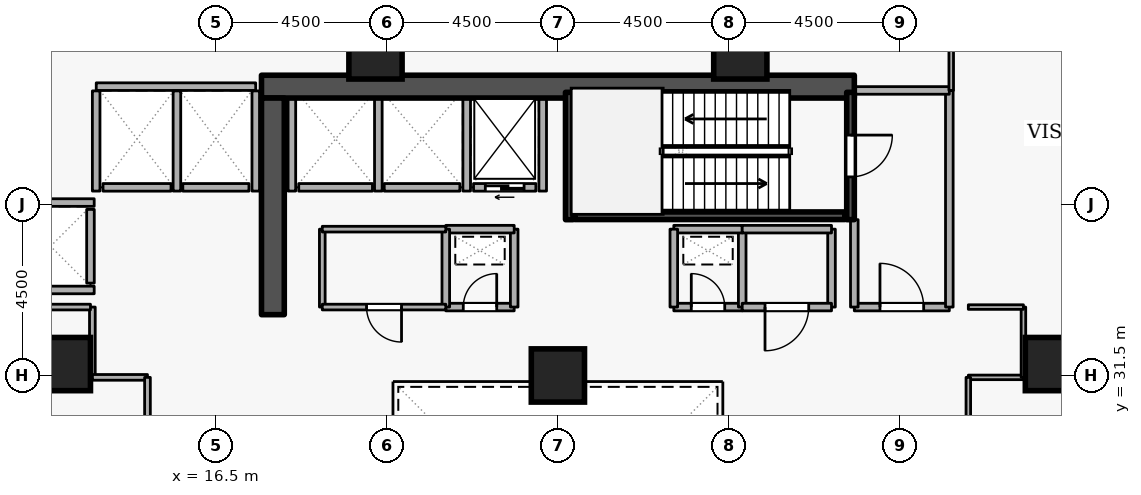
"""IFC4 building model, lengths in metres.
Left out: names, types, materials, properties, quantities, classifications, styles, units other than length and angle.
Written with IfcOpenShell. Run it as: python <this file> out.ifc"""

import sys

from ifc_helpers import new_model, si_unit, direction, frame, frame_2d, origin, origin_2d, place, context, subcontext, project, spatial, rectangle, extrude, element, fill, save


model = new_model("IFC4")
c1 = context("Model", 3, precision=1e-05, world=origin(), true_north=direction((0.0, 1.0)))
c2 = subcontext(c1, "Body", "Model", "MODEL_VIEW")
j1 = project(units=[si_unit("LENGTHUNIT", "METRE"), si_unit("PLANEANGLEUNIT", "RADIAN")], contexts=[c1])
p1 = place(None, origin())
s1 = spatial("IfcSite", under=j1, at=p1, CompositionType="ELEMENT")
p2 = place(p1, origin())
s2 = spatial("IfcBuilding", under=s1, at=p2, CompositionType="ELEMENT")
p3 = place(p2, frame((0.0, 0.0, 49.5)))
s3 = spatial("IfcBuildingStorey", under=s2, at=p3, CompositionType="ELEMENT", Elevation=49.5)
p4 = place(p3, frame((17.7, 39.1, 0.0), z_axis=(0.0, 0.0, 1.0), x_axis=(1.0, 0.0, 0.0)))
e1 = element("IfcWall", 1, at=p4, inside=s3, PredefinedType="SHEAR", context=c2, shape_type="SweptSolid", body=[
    extrude(rectangle(XDim=15.6, YDim=0.6, at=frame_2d((7.8, 0.0))), origin(), (0.0, 0.0, 1.0), 4.2),
])
p5 = place(p3, frame((18.0, 33.1, 0.0), z_axis=(0.0, 0.0, 1.0), x_axis=(0.0, 1.0, 0.0)))
e2 = element("IfcWall", 2, at=p5, inside=s3, PredefinedType="SHEAR", context=c2, shape_type="SweptSolid", body=[
    extrude(rectangle(XDim=5.7, YDim=0.6, at=frame_2d((2.85, 0.0))), origin(), (0.0, 0.0, 1.0), 4.2),
])
for number, where, z_axis, x_axis in (
    (3, (12.5, 31.8, 0.0), (0.0, 0.0, 1.0), (1.0, 0.0, 0.0)),
    (4, (38.5, 31.8, 0.0), (0.0, 0.0, 1.0), (1.0, 0.0, 0.0)),
    (5, (20.7, 40.0, 0.0), (0.0, 0.0, 1.0), (1.0, 0.0, 0.0)),
    (6, (30.3, 40.0, 0.0), (0.0, 0.0, 1.0), (1.0, 0.0, 0.0)),
    (7, (25.5, 31.5, 0.0), (0.0, 0.0, 1.0), (1.0, 0.0, 0.0)),
):
    element("IfcColumn", number, at=place(p3, frame(where, z_axis=z_axis, x_axis=x_axis)), inside=s3, PredefinedType="COLUMN", context=c2, shape_type="SweptSolid", body=[
        extrude(rectangle(XDim=1.4, YDim=1.4, at=origin_2d()), origin(), (0.0, 0.0, 1.0), 4.2),
    ])
p6 = place(p3, frame((24.92, 36.45, 0.0), z_axis=(0.0, 0.0, 1.0), x_axis=(-1.0, 0.0, 0.0)))
e8 = element("IfcWall", 8, at=p6, inside=s3, PredefinedType="STANDARD", context=c2, shape_type="SweptSolid", body=[
    extrude(rectangle(XDim=1.64, YDim=0.2, at=frame_2d((0.82, 0.0))), origin(), (0.0, 0.0, 1.0), 3.94),
])
p7 = place(p6, frame((0.31, 0.0, 0.0)))
e9 = element("IfcOpeningElement", 9, at=p7, cuts=e8, PredefinedType="OPENING", context=c2, shape_type="SweptSolid", body=[
    extrude(rectangle(XDim=1.02, YDim=2.06, at=frame_2d((0.51, 1.03))), frame((0.0, 0.11, 0.0), z_axis=(0.0, -1.0, 0.0), x_axis=(1.0, 0.0, 0.0)), (0.0, 0.0, 1.0), 0.22),
])
p8 = place(p3, frame((22.92, 36.45, 0.0), z_axis=(0.0, 0.0, 1.0), x_axis=(-1.0, 0.0, 0.0)))
e10 = element("IfcWall", 10, at=p8, inside=s3, PredefinedType="STANDARD", context=c2, shape_type="SweptSolid", body=[
    extrude(rectangle(XDim=1.99, YDim=0.2, at=frame_2d((0.995, 0.0))), origin(), (0.0, 0.0, 1.0), 3.94),
])
p9 = place(p3, frame((20.62, 36.45, 0.0), z_axis=(0.0, 0.0, 1.0), x_axis=(-1.0, 0.0, 0.0)))
e11 = element("IfcWall", 11, at=p9, inside=s3, PredefinedType="STANDARD", context=c2, shape_type="SweptSolid", body=[
    extrude(rectangle(XDim=1.94, YDim=0.2, at=frame_2d((0.97, 0.0))), origin(), (0.0, 0.0, 1.0), 3.94),
])
p10 = place(p3, frame((17.37, 36.45, 0.0), z_axis=(0.0, 0.0, 1.0), x_axis=(-1.0, 0.0, 0.0)))
e12 = element("IfcWall", 12, at=p10, inside=s3, PredefinedType="STANDARD", context=c2, shape_type="SweptSolid", body=[
    extrude(rectangle(XDim=1.74, YDim=0.2, at=frame_2d((0.87, 0.0))), origin(), (0.0, 0.0, 1.0), 3.94),
])
p11 = place(p3, frame((15.32, 36.45, 0.0), z_axis=(0.0, 0.0, 1.0), x_axis=(-1.0, 0.0, 0.0)))
e13 = element("IfcWall", 13, at=p11, inside=s3, PredefinedType="STANDARD", context=c2, shape_type="SweptSolid", body=[
    extrude(rectangle(XDim=1.79, YDim=0.2, at=frame_2d((0.895, 0.0))), origin(), (0.0, 0.0, 1.0), 3.94),
])
p12 = place(p3, frame((13.2, 33.93, 0.0), z_axis=(0.0, 0.0, 1.0), x_axis=(0.0, 1.0, 0.0)))
e14 = element("IfcWall", 14, at=p12, inside=s3, PredefinedType="STANDARD", context=c2, shape_type="SweptSolid", body=[
    extrude(rectangle(XDim=1.94, YDim=0.2, at=frame_2d((0.97, 0.0))), origin(), (0.0, 0.0, 1.0), 3.94),
])
for number, where, z_axis, x_axis in (
    (15, (25.1, 36.352, 0.0), (0.0, 0.0, 1.0), (0.0, 1.0, 0.0)),
    (16, (23.1, 36.352, 0.0), (0.0, 0.0, 1.0), (0.0, 1.0, 0.0)),
    (17, (20.775, 36.352, 0.0), (0.0, 0.0, 1.0), (0.0, 1.0, 0.0)),
    (18, (18.5, 36.352, 0.0), (0.0, 0.0, 1.0), (0.0, 1.0, 0.0)),
):
    element("IfcWall", number, at=place(p3, frame(where, z_axis=z_axis, x_axis=x_axis)), inside=s3, PredefinedType="STANDARD", context=c2, shape_type="SweptSolid", body=[
        extrude(rectangle(XDim=2.436, YDim=0.2, at=frame_2d((1.218, 0.0))), origin(), (0.0, 0.0, 1.0), 3.94),
    ])
p13 = place(p3, frame((13.352, 39.1, 0.0), z_axis=(0.0, 0.0, 1.0), x_axis=(1.0, 0.0, 0.0)))
e19 = element("IfcWall", 19, at=p13, inside=s3, PredefinedType="STANDARD", context=c2, shape_type="SweptSolid", body=[
    extrude(rectangle(XDim=4.196, YDim=0.2, at=frame_2d((2.098, 0.0))), origin(), (0.0, 0.0, 1.0), 3.94),
])
p14 = place(p3, frame((17.55, 36.352, 0.0), z_axis=(0.0, 0.0, 1.0), x_axis=(0.0, 1.0, 0.0)))
e20 = element("IfcWall", 20, at=p14, inside=s3, PredefinedType="STANDARD", context=c2, shape_type="SweptSolid", body=[
    extrude(rectangle(XDim=2.636, YDim=0.2, at=frame_2d((1.318, 0.0))), origin(), (0.0, 0.0, 1.0), 3.145),
])
for number, where, z_axis, x_axis in (
    (21, (15.475, 36.352, 0.0), (0.0, 0.0, 1.0), (0.0, 1.0, 0.0)),
    (22, (13.35, 36.352, 0.0), (0.0, 0.0, 1.0), (0.0, 1.0, 0.0)),
):
    element("IfcWall", number, at=place(p3, frame(where, z_axis=z_axis, x_axis=x_axis)), inside=s3, PredefinedType="STANDARD", context=c2, shape_type="SweptSolid", body=[
        extrude(rectangle(XDim=2.636, YDim=0.2, at=frame_2d((1.318, 0.0))), origin(), (0.0, 0.0, 1.0), 3.94),
    ])
for number, where, z_axis, x_axis in (
    (23, (11.002, 36.05, 0.0), (0.0, 0.0, 1.0), (1.0, 0.0, 0.0)),
    (24, (11.002, 33.75, 0.0), (0.0, 0.0, 1.0), (1.0, 0.0, 0.0)),
):
    element("IfcWall", number, at=place(p3, frame(where, z_axis=z_axis, x_axis=x_axis)), inside=s3, PredefinedType="STANDARD", context=c2, shape_type="SweptSolid", body=[
        extrude(rectangle(XDim=2.296, YDim=0.2, at=frame_2d((1.148, 0.0))), origin(), (0.0, 0.0, 1.0), 3.94),
    ])
p15 = place(p3, frame((33.2, 38.95, 0.0), z_axis=(0.0, 0.0, 1.0), x_axis=(0.0, -1.0, 0.0)))
e25 = element("IfcWall", 25, at=p15, inside=s3, PredefinedType="SHEAR", context=c2, shape_type="SweptSolid", body=[
    extrude(rectangle(XDim=3.35, YDim=0.2, at=frame_2d((1.675, 0.0))), origin(), (0.0, 0.0, 1.0), 4.2),
])
p16 = place(p15, frame((1.125, 0.0, 0.0)))
e26 = element("IfcOpeningElement", 26, at=p16, cuts=e25, PredefinedType="OPENING", context=c2, shape_type="SweptSolid", body=[
    extrude(rectangle(XDim=1.1, YDim=2.1, at=frame_2d((0.55, 1.05))), frame((0.0, 0.11, 0.0), z_axis=(0.0, -1.0, 0.0), x_axis=(1.0, 0.0, 0.0)), (0.0, 0.0, 1.0), 0.22),
])
p17 = place(p3, frame((25.8, 35.6, 0.0), z_axis=(0.0, 0.0, 1.0), x_axis=(0.0, 1.0, 0.0)))
e27 = element("IfcWall", 27, at=p17, inside=s3, PredefinedType="SHEAR", context=c2, shape_type="SweptSolid", body=[
    extrude(rectangle(XDim=3.35, YDim=0.2, at=frame_2d((1.675, 0.0))), origin(), (0.0, 0.0, 1.0), 4.2),
])
p18 = place(p3, frame((25.95, 35.703, 0.0), z_axis=(0.0, 0.0, 1.0), x_axis=(1.0, 0.0, 0.0)))
e28 = element("IfcWall", 28, at=p18, inside=s3, PredefinedType="SHEAR", context=c2, shape_type="SweptSolid", body=[
    extrude(rectangle(XDim=7.1, YDim=0.2, at=frame_2d((3.55, 0.0))), origin(), (0.0, 0.0, 1.0), 4.2),
])
p19 = place(p3, frame((33.3, 33.3, 0.0), z_axis=(0.0, 0.0, 1.0), x_axis=(1.0, 0.0, 0.0)))
e29 = element("IfcWall", 29, at=p19, inside=s3, PredefinedType="STANDARD", context=c2, shape_type="SweptSolid", body=[
    extrude(rectangle(XDim=2.5, YDim=0.2, at=frame_2d((1.25, 0.0))), origin(), (0.0, 0.0, 1.0), 3.94),
])
p20 = place(p19, frame((0.675, 0.0, 0.0)))
e30 = element("IfcOpeningElement", 30, at=p20, cuts=e29, PredefinedType="OPENING", context=c2, shape_type="SweptSolid", body=[
    extrude(rectangle(XDim=1.15, YDim=2.1, at=frame_2d((0.575, 1.05))), frame((0.0, 0.11, 0.0), z_axis=(0.0, -1.0, 0.0), x_axis=(1.0, 0.0, 0.0)), (0.0, 0.0, 1.0), 0.22),
])
p21 = place(p3, frame((35.8, 33.3, 0.0), z_axis=(0.0, 0.0, 1.0), x_axis=(0.0, 1.0, 0.0)))
e31 = element("IfcWall", 31, at=p21, inside=s3, PredefinedType="STANDARD", context=c2, shape_type="SweptSolid", body=[
    extrude(rectangle(XDim=5.7, YDim=0.2, at=frame_2d((2.85, 0.0))), origin(), (0.0, 0.0, 1.0), 3.94),
])
p22 = place(p3, frame((35.8, 39.0, 0.0), z_axis=(0.0, 0.0, 1.0), x_axis=(-1.0, 0.0, 0.0)))
e32 = element("IfcWall", 32, at=p22, inside=s3, PredefinedType="STANDARD", context=c2, shape_type="SweptSolid", body=[
    extrude(rectangle(XDim=2.5, YDim=0.2, at=frame_2d((1.25, 0.0))), origin(), (0.0, 0.0, 1.0), 3.94),
])
p23 = place(p3, frame((33.3, 35.6, 0.0), z_axis=(0.0, 0.0, 1.0), x_axis=(0.0, -1.0, 0.0)))
e33 = element("IfcWall", 33, at=p23, inside=s3, PredefinedType="STANDARD", context=c2, shape_type="SweptSolid", body=[
    extrude(rectangle(XDim=2.3, YDim=0.2, at=frame_2d((1.15, 0.0))), origin(), (0.0, 0.0, 1.0), 3.145),
])
p24 = place(p3, frame((22.55, 33.3, 0.0), z_axis=(0.0, 0.0, 1.0), x_axis=(1.0, 0.0, 0.0)))
e34 = element("IfcWall", 34, at=p24, inside=s3, PredefinedType="STANDARD", context=c2, shape_type="SweptSolid", body=[
    extrude(rectangle(XDim=1.8, YDim=0.2, at=frame_2d((0.9, 0.0))), origin(), (0.0, 0.0, 1.0), 3.94),
])
p25 = place(p24, frame((0.46, 0.0, 0.0)))
e35 = element("IfcOpeningElement", 35, at=p25, cuts=e34, PredefinedType="OPENING", context=c2, shape_type="SweptSolid", body=[
    extrude(rectangle(XDim=0.88, YDim=2.04, at=frame_2d((0.44, 1.02))), frame((0.0, 0.11, 0.0), z_axis=(0.0, -1.0, 0.0), x_axis=(1.0, 0.0, 0.0)), (0.0, 0.0, 1.0), 0.22),
])
p26 = place(p3, frame((24.35, 33.3, 0.0), z_axis=(0.0, 0.0, 1.0), x_axis=(0.0, 1.0, 0.0)))
e36 = element("IfcWall", 36, at=p26, inside=s3, PredefinedType="STANDARD", context=c2, shape_type="SweptSolid", body=[
    extrude(rectangle(XDim=2.05, YDim=0.2, at=frame_2d((1.025, 0.0))), origin(), (0.0, 0.0, 1.0), 3.94),
])
p27 = place(p3, frame((24.35, 35.35, 0.0), z_axis=(0.0, 0.0, 1.0), x_axis=(-1.0, 0.0, 0.0)))
e37 = element("IfcWall", 37, at=p27, inside=s3, PredefinedType="STANDARD", context=c2, shape_type="SweptSolid", body=[
    extrude(rectangle(XDim=1.8, YDim=0.2, at=frame_2d((0.9, 0.0))), origin(), (0.0, 0.0, 1.0), 3.94),
])
p28 = place(p3, frame((22.55, 35.35, 0.0), z_axis=(0.0, 0.0, 1.0), x_axis=(0.0, -1.0, 0.0)))
e38 = element("IfcWall", 38, at=p28, inside=s3, PredefinedType="STANDARD", context=c2, shape_type="SweptSolid", body=[
    extrude(rectangle(XDim=2.05, YDim=0.2, at=frame_2d((1.025, 0.0))), origin(), (0.0, 0.0, 1.0), 3.94),
])
p29 = place(p3, frame((28.55, 33.3, 0.0), z_axis=(0.0, 0.0, 1.0), x_axis=(1.0, 0.0, 0.0)))
e39 = element("IfcWall", 39, at=p29, inside=s3, PredefinedType="STANDARD", context=c2, shape_type="SweptSolid", body=[
    extrude(rectangle(XDim=1.8, YDim=0.2, at=frame_2d((0.9, 0.0))), origin(), (0.0, 0.0, 1.0), 3.94),
])
p30 = place(p29, frame((0.46, 0.0, 0.0)))
e40 = element("IfcOpeningElement", 40, at=p30, cuts=e39, PredefinedType="OPENING", context=c2, shape_type="SweptSolid", body=[
    extrude(rectangle(XDim=0.88, YDim=2.04, at=frame_2d((0.44, 1.02))), frame((0.0, 0.11, 0.0), z_axis=(0.0, -1.0, 0.0), x_axis=(1.0, 0.0, 0.0)), (0.0, 0.0, 1.0), 0.22),
])
p31 = place(p3, frame((30.35, 33.3, 0.0), z_axis=(0.0, 0.0, 1.0), x_axis=(0.0, 1.0, 0.0)))
e41 = element("IfcWall", 41, at=p31, inside=s3, PredefinedType="STANDARD", context=c2, shape_type="SweptSolid", body=[
    extrude(rectangle(XDim=2.05, YDim=0.2, at=frame_2d((1.025, 0.0))), origin(), (0.0, 0.0, 1.0), 3.94),
])
p32 = place(p3, frame((30.35, 35.35, 0.0), z_axis=(0.0, 0.0, 1.0), x_axis=(-1.0, 0.0, 0.0)))
e42 = element("IfcWall", 42, at=p32, inside=s3, PredefinedType="STANDARD", context=c2, shape_type="SweptSolid", body=[
    extrude(rectangle(XDim=1.8, YDim=0.2, at=frame_2d((0.9, 0.0))), origin(), (0.0, 0.0, 1.0), 3.94),
])
p33 = place(p3, frame((28.55, 35.35, 0.0), z_axis=(0.0, 0.0, 1.0), x_axis=(0.0, -1.0, 0.0)))
e43 = element("IfcWall", 43, at=p33, inside=s3, PredefinedType="STANDARD", context=c2, shape_type="SweptSolid", body=[
    extrude(rectangle(XDim=2.05, YDim=0.2, at=frame_2d((1.025, 0.0))), origin(), (0.0, 0.0, 1.0), 3.94),
])
p34 = place(p3, frame((32.7, 35.35, 0.0), z_axis=(0.0, 0.0, 1.0), x_axis=(0.0, -1.0, 0.0)))
e44 = element("IfcWall", 44, at=p34, inside=s3, PredefinedType="STANDARD", context=c2, shape_type="SweptSolid", body=[
    extrude(rectangle(XDim=2.05, YDim=0.2, at=frame_2d((1.025, 0.0))), origin(), (0.0, 0.0, 1.0), 3.145),
])
p35 = place(p3, frame((32.7, 33.3, 0.0), z_axis=(0.0, 0.0, 1.0), x_axis=(-1.0, 0.0, 0.0)))
e45 = element("IfcWall", 45, at=p35, inside=s3, PredefinedType="STANDARD", context=c2, shape_type="SweptSolid", body=[
    extrude(rectangle(XDim=2.35, YDim=0.2, at=frame_2d((1.175, 0.0))), origin(), (0.0, 0.0, 1.0), 3.94),
])
p36 = place(p35, frame((0.6, 0.0, 0.0)))
e46 = element("IfcOpeningElement", 46, at=p36, cuts=e45, PredefinedType="OPENING", context=c2, shape_type="SweptSolid", body=[
    extrude(rectangle(XDim=1.15, YDim=2.1, at=frame_2d((0.575, 1.05))), frame((0.0, 0.11, 0.0), z_axis=(0.0, -1.0, 0.0), x_axis=(1.0, 0.0, 0.0)), (0.0, 0.0, 1.0), 0.22),
])
p37 = place(p3, frame((30.35, 35.35, 0.0), z_axis=(0.0, 0.0, 1.0), x_axis=(1.0, 0.0, 0.0)))
e47 = element("IfcWall", 47, at=p37, inside=s3, PredefinedType="STANDARD", context=c2, shape_type="SweptSolid", body=[
    extrude(rectangle(XDim=2.35, YDim=0.2, at=frame_2d((1.175, 0.0))), origin(), (0.0, 0.0, 1.0), 3.94),
])
p38 = place(p3, frame((19.3, 33.3, 0.0), z_axis=(0.0, 0.0, 1.0), x_axis=(0.0, 1.0, 0.0)))
e48 = element("IfcWall", 48, at=p38, inside=s3, PredefinedType="PARTITIONING", context=c2, shape_type="SweptSolid", body=[
    extrude(rectangle(XDim=2.05, YDim=0.15, at=frame_2d((1.025, 0.0))), origin(), (0.0, 0.0, 1.0), 3.94),
])
p39 = place(p3, frame((19.3, 35.35, 0.0), z_axis=(0.0, 0.0, 1.0), x_axis=(1.0, 0.0, 0.0)))
e49 = element("IfcWall", 49, at=p39, inside=s3, PredefinedType="PARTITIONING", context=c2, shape_type="SweptSolid", body=[
    extrude(rectangle(XDim=3.25, YDim=0.15, at=frame_2d((1.625, 0.0))), origin(), (0.0, 0.0, 1.0), 3.94),
])
p40 = place(p3, frame((22.55, 33.3, 0.0), z_axis=(0.0, 0.0, 1.0), x_axis=(-1.0, 0.0, 0.0)))
e50 = element("IfcWall", 50, at=p40, inside=s3, PredefinedType="PARTITIONING", context=c2, shape_type="SweptSolid", body=[
    extrude(rectangle(XDim=3.25, YDim=0.15, at=frame_2d((1.625, 0.0))), origin(), (0.0, 0.0, 1.0), 3.94),
])
p41 = place(p40, frame((1.165, 0.0, 0.0)))
e51 = element("IfcOpeningElement", 51, at=p41, cuts=e50, PredefinedType="OPENING", context=c2, shape_type="SweptSolid", body=[
    extrude(rectangle(XDim=0.92, YDim=2.08, at=frame_2d((0.46, 1.04))), frame((0.0, 0.085, 0.0), z_axis=(0.0, -1.0, 0.0), x_axis=(1.0, 0.0, 0.0)), (0.0, 0.0, 1.0), 0.17),
])
p42 = place(p3, frame((13.25, 33.3, 0.0), z_axis=(0.0, 0.0, 1.0), x_axis=(0.0, -1.0, 0.0)))
e52 = element("IfcWall", 52, at=p42, inside=s3, PredefinedType="PARTITIONING", context=c2, shape_type="SweptSolid", body=[
    extrude(rectangle(XDim=1.85, YDim=0.15, at=frame_2d((0.925, 0.0))), origin(), (0.0, 0.0, 1.0), 3.94),
])
p43 = place(p3, frame((13.25, 31.45, 0.0), z_axis=(0.0, 0.0, 1.0), x_axis=(1.0, 0.0, 0.0)))
e53 = element("IfcWall", 53, at=p43, inside=s3, PredefinedType="PARTITIONING", context=c2, shape_type="SweptSolid", body=[
    extrude(rectangle(XDim=1.45, YDim=0.15, at=frame_2d((0.725, 0.0))), origin(), (0.0, 0.0, 1.0), 3.94),
])
p44 = place(p3, frame((14.7, 31.45, 0.0), z_axis=(0.0, 0.0, 1.0), x_axis=(0.0, -1.0, 0.0)))
e54 = element("IfcWall", 54, at=p44, inside=s3, PredefinedType="PARTITIONING", context=c2, shape_type="SweptSolid", body=[
    extrude(rectangle(XDim=4.45, YDim=0.15, at=frame_2d((2.225, 0.0))), origin(), (0.0, 0.0, 1.0), 3.94),
])
p45 = place(p44, frame((1.575, 0.0, 0.0)))
e55 = element("IfcOpeningElement", 55, at=p45, cuts=e54, PredefinedType="OPENING", context=c2, shape_type="SweptSolid", body=[
    extrude(rectangle(XDim=1.3, YDim=2.12, at=frame_2d((0.65, 1.06))), frame((0.0, 0.085, 0.0), z_axis=(0.0, -1.0, 0.0), x_axis=(1.0, 0.0, 0.0)), (0.0, 0.0, 1.0), 0.17),
])
p46 = place(p3, frame((10.9, 33.3, 0.0), z_axis=(0.0, 0.0, 1.0), x_axis=(1.0, 0.0, 0.0)))
e56 = element("IfcWall", 56, at=p46, inside=s3, PredefinedType="PARTITIONING", context=c2, shape_type="SweptSolid", body=[
    extrude(rectangle(XDim=2.3, YDim=0.15, at=frame_2d((1.15, 0.0))), origin(), (0.0, 0.0, 1.0), 3.94),
])
p47 = place(p3, frame((36.3, 31.45, 0.0), z_axis=(0.0, 0.0, 1.0), x_axis=(1.0, 0.0, 0.0)))
e57 = element("IfcWall", 57, at=p47, inside=s3, PredefinedType="PARTITIONING", context=c2, shape_type="SweptSolid", body=[
    extrude(rectangle(XDim=1.45, YDim=0.12, at=frame_2d((0.725, 0.0))), origin(), (0.0, 0.0, 1.0), 3.94),
])
p48 = place(p3, frame((37.75, 31.45, 0.0), z_axis=(0.0, 0.0, 1.0), x_axis=(0.0, 1.0, 0.0)))
e58 = element("IfcWall", 58, at=p48, inside=s3, PredefinedType="PARTITIONING", context=c2, shape_type="SweptSolid", body=[
    extrude(rectangle(XDim=1.85, YDim=0.12, at=frame_2d((0.925, 0.0))), origin(), (0.0, 0.0, 1.0), 3.94),
])
p49 = place(p3, frame((37.75, 33.3, 0.0), z_axis=(0.0, 0.0, 1.0), x_axis=(-1.0, 0.0, 0.0)))
e59 = element("IfcWall", 59, at=p49, inside=s3, PredefinedType="PARTITIONING", context=c2, shape_type="SweptSolid", body=[
    extrude(rectangle(XDim=1.45, YDim=0.12, at=frame_2d((0.725, 0.0))), origin(), (0.0, 0.0, 1.0), 3.94),
])
p50 = place(p3, frame((35.85, 39.0, 0.0), z_axis=(0.0, 0.0, 1.0), x_axis=(0.0, 1.0, 0.0)))
e60 = element("IfcWall", 60, at=p50, inside=s3, PredefinedType="PARTITIONING", context=c2, shape_type="SweptSolid", body=[
    extrude(rectangle(XDim=6.22, YDim=0.12, at=frame_2d((3.11, 0.0))), origin(), (0.0, 0.0, 1.0), 3.94),
])
p51 = place(p3, frame((36.3, 27.0, 0.0), z_axis=(0.0, 0.0, 1.0), x_axis=(0.0, 1.0, 0.0)))
e61 = element("IfcWall", 61, at=p51, inside=s3, PredefinedType="PARTITIONING", context=c2, shape_type="SweptSolid", body=[
    extrude(rectangle(XDim=4.45, YDim=0.12, at=frame_2d((2.225, 0.0))), origin(), (0.0, 0.0, 1.0), 3.94),
])
p52 = place(p51, frame((1.7, 0.0, 0.0)))
e62 = element("IfcOpeningElement", 62, at=p52, cuts=e61, PredefinedType="OPENING", context=c2, shape_type="SweptSolid", body=[
    extrude(rectangle(XDim=1.05, YDim=2.1, at=frame_2d((0.525, 1.05))), frame((0.0, 0.07, 0.0), z_axis=(0.0, -1.0, 0.0), x_axis=(1.0, 0.0, 0.0)), (0.0, 0.0, 1.0), 0.14),
])
p53 = place(p7, origin())
e63 = element("IfcDoor", 63, at=p53, inside=s3, OperationType="SLIDING_TO_LEFT", PredefinedType="DOOR", context=c2, shape_type="SweptSolid", body=[
    extrude(rectangle(XDim=1.02, YDim=2.06, at=frame_2d((0.51, 1.03))), frame((0.0, 0.025, 0.0), z_axis=(0.0, -1.0, 0.0), x_axis=(1.0, 0.0, 0.0)), (0.0, 0.0, 1.0), 0.05),
])
fill(e9, e63)
p54 = place(p16, origin())
e64 = element("IfcDoor", 64, at=p54, inside=s3, OperationType="SINGLE_SWING_LEFT", PredefinedType="DOOR", context=c2, shape_type="SweptSolid", body=[
    extrude(rectangle(XDim=1.1, YDim=2.1, at=frame_2d((0.55, 1.05))), frame((0.0, 0.025, 0.0), z_axis=(0.0, -1.0, 0.0), x_axis=(1.0, 0.0, 0.0)), (0.0, 0.0, 1.0), 0.05),
])
fill(e26, e64)
p55 = place(p20, origin())
e65 = element("IfcDoor", 65, at=p55, inside=s3, OperationType="SINGLE_SWING_LEFT", PredefinedType="DOOR", context=c2, shape_type="SweptSolid", body=[
    extrude(rectangle(XDim=1.15, YDim=2.1, at=frame_2d((0.575, 1.05))), frame((0.0, 0.025, 0.0), z_axis=(0.0, -1.0, 0.0), x_axis=(1.0, 0.0, 0.0)), (0.0, 0.0, 1.0), 0.05),
])
fill(e30, e65)
p56 = place(p25, origin())
e66 = element("IfcDoor", 66, at=p56, inside=s3, OperationType="SINGLE_SWING_RIGHT", PredefinedType="DOOR", context=c2, shape_type="SweptSolid", body=[
    extrude(rectangle(XDim=0.88, YDim=2.04, at=frame_2d((0.44, 1.02))), frame((0.0, 0.025, 0.0), z_axis=(0.0, -1.0, 0.0), x_axis=(1.0, 0.0, 0.0)), (0.0, 0.0, 1.0), 0.05),
])
fill(e35, e66)
p57 = place(p30, origin())
e67 = element("IfcDoor", 67, at=p57, inside=s3, OperationType="SINGLE_SWING_LEFT", PredefinedType="DOOR", context=c2, shape_type="SweptSolid", body=[
    extrude(rectangle(XDim=0.88, YDim=2.04, at=frame_2d((0.44, 1.02))), frame((0.0, 0.025, 0.0), z_axis=(0.0, -1.0, 0.0), x_axis=(1.0, 0.0, 0.0)), (0.0, 0.0, 1.0), 0.05),
])
fill(e40, e67)
p58 = place(p41, origin())
e68 = element("IfcDoor", 68, at=p58, inside=s3, OperationType="SINGLE_SWING_LEFT", PredefinedType="DOOR", context=c2, shape_type="SweptSolid", body=[
    extrude(rectangle(XDim=0.92, YDim=2.08, at=frame_2d((0.46, 1.04))), frame((0.0, 0.025, 0.0), z_axis=(0.0, -1.0, 0.0), x_axis=(1.0, 0.0, 0.0)), (0.0, 0.0, 1.0), 0.05),
])
fill(e51, e68)
p59 = place(p36, origin())
e69 = element("IfcDoor", 69, at=p59, inside=s3, OperationType="SINGLE_SWING_RIGHT", PredefinedType="DOOR", context=c2, shape_type="SweptSolid", body=[
    extrude(rectangle(XDim=1.15, YDim=2.1, at=frame_2d((0.575, 1.05))), frame((0.0, 0.025, 0.0), z_axis=(0.0, -1.0, 0.0), x_axis=(1.0, 0.0, 0.0)), (0.0, 0.0, 1.0), 0.05),
])
fill(e46, e69)
save(model, sys.argv[1])
